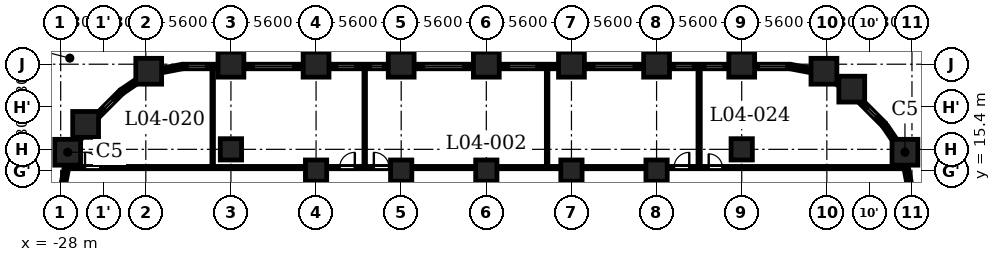
"""IFC4 building model, lengths in metres.
Left out: names, types, materials, properties, quantities, classifications, styles, units other than length and angle.
Written with IfcOpenShell. Run it as: python <this file> out.ifc"""

import sys

from ifc_helpers import new_model, si_unit, direction, frame, frame_2d, origin, origin_2d, place, context, subcontext, project, spatial, rectangle, extrude, element, fill, save


model = new_model("IFC4")
c1 = context("Model", 3, precision=1e-05, world=origin(), true_north=direction((0.0, 1.0)))
c2 = subcontext(c1, "Body", "Model", "MODEL_VIEW")
j1 = project(units=[si_unit("LENGTHUNIT", "METRE"), si_unit("PLANEANGLEUNIT", "RADIAN")], contexts=[c1])
p1 = place(None, origin())
s1 = spatial("IfcSite", under=j1, at=p1, CompositionType="ELEMENT")
p2 = place(p1, origin())
s2 = spatial("IfcBuilding", under=s1, at=p2, CompositionType="ELEMENT")
p3 = place(p2, frame((0.0, 0.0, 20.9)))
s3 = spatial("IfcBuildingStorey", under=s2, at=p3, CompositionType="ELEMENT", Elevation=20.9)
for number, where, z_axis, x_axis in (
    (1, (27.538, 16.609, 0.0), (0.0, 0.0, 1.0), (1.0, 0.0, 0.0)),
    (2, (24.04, 20.76, 0.0), (0.0, 0.0, 1.0), (1.0, 0.0, 0.0)),
    (3, (22.209, 21.938, 0.0), (0.0, 0.0, 1.0), (1.0, 0.0, 0.0)),
    (4, (16.8, 22.4, 0.0), (0.0, 0.0, 1.0), (1.0, 0.0, 0.0)),
    (5, (11.2, 22.4, 0.0), (0.0, 0.0, 1.0), (1.0, 0.0, 0.0)),
    (6, (5.6, 22.4, 0.0), (0.0, 0.0, 1.0), (1.0, 0.0, 0.0)),
    (7, (0.0, 22.4, 0.0), (0.0, 0.0, 1.0), (1.0, 0.0, 0.0)),
    (8, (-5.6, 22.4, 0.0), (0.0, 0.0, 1.0), (1.0, 0.0, 0.0)),
    (9, (-11.2, 22.4, 0.0), (0.0, 0.0, 1.0), (1.0, 0.0, 0.0)),
    (10, (-16.8, 22.4, 0.0), (0.0, 0.0, 1.0), (1.0, 0.0, 0.0)),
    (11, (-22.209, 21.938, 0.0), (0.0, 0.0, 1.0), (1.0, 0.0, 0.0)),
    (12, (-26.36, 18.44, 0.0), (0.0, 0.0, 1.0), (1.0, 0.0, 0.0)),
    (13, (-27.538, 16.609, 0.0), (0.0, 0.0, 1.0), (1.0, 0.0, 0.0)),
):
    element("IfcColumn", number, at=place(p3, frame(where, z_axis=z_axis, x_axis=x_axis)), inside=s3, PredefinedType="COLUMN", context=c2, shape_type="SweptSolid", body=[
        extrude(rectangle(XDim=1.7, YDim=1.7, at=origin_2d()), origin(), (0.0, 0.0, 1.0), 4.8),
    ])
for number, where, z_axis, x_axis in (
    (14, (-16.8, 16.8, 0.0), (0.0, 0.0, 1.0), (1.0, 0.0, 0.0)),
    (15, (16.8, 16.8, 0.0), (0.0, 0.0, 1.0), (1.0, 0.0, 0.0)),
    (16, (-11.2, 15.4, 0.0), (0.0, 0.0, 1.0), (1.0, 0.0, 0.0)),
    (17, (-5.6, 15.4, 0.0), (0.0, 0.0, 1.0), (1.0, 0.0, 0.0)),
    (18, (0.0, 15.4, 0.0), (0.0, 0.0, 1.0), (1.0, 0.0, 0.0)),
    (19, (5.6, 15.4, 0.0), (0.0, 0.0, 1.0), (1.0, 0.0, 0.0)),
    (20, (11.2, 15.4, 0.0), (0.0, 0.0, 1.0), (1.0, 0.0, 0.0)),
):
    element("IfcColumn", number, at=place(p3, frame(where, z_axis=z_axis, x_axis=x_axis)), inside=s3, PredefinedType="COLUMN", context=c2, shape_type="SweptSolid", body=[
        extrude(rectangle(XDim=1.4, YDim=1.4, at=origin_2d()), origin(), (0.0, 0.0, 1.0), 4.8),
    ])
for number, where, z_axis, x_axis in (
    (21, (27.853, 14.372, 0.0), (0.0, 0.0, 1.0), (-0.187, 0.982, 0.0)),
    (22, (26.969, 17.25, 0.0), (0.0, 0.0, 1.0), (-0.562, 0.827, 0.0)),
):
    element("IfcWall", number, at=place(p3, frame(where, z_axis=z_axis, x_axis=x_axis)), inside=s3, PredefinedType="SOLIDWALL", context=c2, shape_type="SweptSolid", body=[
        extrude(rectangle(XDim=1.406, YDim=0.3, at=frame_2d((0.703, 0.0))), origin(), (0.0, 0.0, 1.0), 3.55),
    ])
p4 = place(p3, frame((26.197, 18.391, 0.0), z_axis=(0.0, 0.0, 1.0), x_axis=(-0.707054835785, 0.707158722772, 0.0)))
e23 = element("IfcWall", 23, at=p4, inside=s3, PredefinedType="SOLIDWALL", context=c2, shape_type="SweptSolid", body=[
    extrude(rectangle(XDim=2.35, YDim=0.3, at=frame_2d((1.175, 0.0))), origin(), (0.0, 0.0, 1.0), 3.55),
])
p5 = place(p4, frame((0.775, 0.0, 0.6)))
e24 = element("IfcOpeningElement", 24, at=p5, cuts=e23, PredefinedType="OPENING", context=c2, shape_type="SweptSolid", body=[
    extrude(rectangle(XDim=0.8, YDim=1.55, at=frame_2d((0.4, 0.775))), frame((0.0, 0.16, 0.0), z_axis=(0.0, -1.0, 0.0), x_axis=(1.0, 0.0, 0.0)), (0.0, 0.0, 1.0), 0.32),
])
p6 = place(p3, frame((23.244, 21.101, 0.0), z_axis=(0.0, 0.0, 1.0), x_axis=(-0.827135885329, 0.562001981492, 0.0)))
e25 = element("IfcWall", 25, at=p6, inside=s3, PredefinedType="SOLIDWALL", context=c2, shape_type="SweptSolid", body=[
    extrude(rectangle(XDim=0.477, YDim=0.3, at=frame_2d((0.239, 0.0))), origin(), (0.0, 0.0, 1.0), 4.45),
])
p7 = place(p3, frame((21.353, 21.989, 0.0), z_axis=(0.0, 0.0, 1.0), x_axis=(-0.98229142023, 0.187359455971, 0.0)))
e26 = element("IfcWall", 26, at=p7, inside=s3, PredefinedType="SOLIDWALL", context=c2, shape_type="SweptSolid", body=[
    extrude(rectangle(XDim=1.406, YDim=0.3, at=frame_2d((0.703, 0.0))), origin(), (0.0, 0.0, 1.0), 3.55),
])
p8 = place(p3, frame((20.0, 22.25, 0.0), z_axis=(0.0, 0.0, 1.0), x_axis=(-1.0, 0.0, 0.0)))
e27 = element("IfcWall", 27, at=p8, inside=s3, PredefinedType="SOLIDWALL", context=c2, shape_type="SweptSolid", body=[
    extrude(rectangle(XDim=2.35, YDim=0.3, at=frame_2d((1.175, 0.0))), origin(), (0.0, 0.0, 1.0), 3.55),
])
p9 = place(p8, frame((0.275, 0.0, 0.9)))
e28 = element("IfcOpeningElement", 28, at=p9, cuts=e27, PredefinedType="OPENING", context=c2, shape_type="SweptSolid", body=[
    extrude(rectangle(XDim=1.8, YDim=1.25, at=frame_2d((0.9, 0.625))), frame((0.0, 0.16, 0.0), z_axis=(0.0, -1.0, 0.0), x_axis=(1.0, 0.0, 0.0)), (0.0, 0.0, 1.0), 0.32),
])
p10 = place(p3, frame((15.95, 22.25, 0.0), z_axis=(0.0, 0.0, 1.0), x_axis=(-1.0, 0.0, 0.0)))
e29 = element("IfcWall", 29, at=p10, inside=s3, PredefinedType="SOLIDWALL", context=c2, shape_type="SweptSolid", body=[
    extrude(rectangle(XDim=3.9, YDim=0.3, at=frame_2d((1.95, 0.0))), origin(), (0.0, 0.0, 1.0), 3.55),
])
p11 = place(p10, frame((0.337, 0.0, 0.6)))
e30 = element("IfcOpeningElement", 30, at=p11, cuts=e29, PredefinedType="OPENING", context=c2, shape_type="SweptSolid", body=[
    extrude(rectangle(XDim=1.2, YDim=1.55, at=frame_2d((0.6, 0.775))), frame((0.0, 0.16, 0.0), z_axis=(0.0, -1.0, 0.0), x_axis=(1.0, 0.0, 0.0)), (0.0, 0.0, 1.0), 0.32),
])
p12 = place(p10, frame((2.363, 0.0, 0.6)))
e31 = element("IfcOpeningElement", 31, at=p12, cuts=e29, PredefinedType="OPENING", context=c2, shape_type="SweptSolid", body=[
    extrude(rectangle(XDim=1.2, YDim=1.55, at=frame_2d((0.6, 0.775))), frame((0.0, 0.16, 0.0), z_axis=(0.0, -1.0, 0.0), x_axis=(1.0, 0.0, 0.0)), (0.0, 0.0, 1.0), 0.32),
])
p13 = place(p3, frame((10.35, 22.25, 0.0), z_axis=(0.0, 0.0, 1.0), x_axis=(-1.0, 0.0, 0.0)))
e32 = element("IfcWall", 32, at=p13, inside=s3, PredefinedType="SOLIDWALL", context=c2, shape_type="SweptSolid", body=[
    extrude(rectangle(XDim=3.9, YDim=0.3, at=frame_2d((1.95, 0.0))), origin(), (0.0, 0.0, 1.0), 3.55),
])
p14 = place(p13, frame((0.65, 0.0, 0.9)))
e33 = element("IfcOpeningElement", 33, at=p14, cuts=e32, PredefinedType="OPENING", context=c2, shape_type="SweptSolid", body=[
    extrude(rectangle(XDim=2.6, YDim=1.25, at=frame_2d((1.3, 0.625))), frame((0.0, 0.16, 0.0), z_axis=(0.0, -1.0, 0.0), x_axis=(1.0, 0.0, 0.0)), (0.0, 0.0, 1.0), 0.32),
])
p15 = place(p3, frame((4.75, 22.25, 0.0), z_axis=(0.0, 0.0, 1.0), x_axis=(-1.0, 0.0, 0.0)))
e34 = element("IfcWall", 34, at=p15, inside=s3, PredefinedType="SOLIDWALL", context=c2, shape_type="SweptSolid", body=[
    extrude(rectangle(XDim=3.9, YDim=0.3, at=frame_2d((1.95, 0.0))), origin(), (0.0, 0.0, 1.0), 3.55),
])
p16 = place(p15, frame((1.462, 0.0, 0.9)))
e35 = element("IfcOpeningElement", 35, at=p16, cuts=e34, PredefinedType="OPENING", context=c2, shape_type="SweptSolid", body=[
    extrude(rectangle(XDim=1.8, YDim=1.25, at=frame_2d((0.9, 0.625))), frame((0.0, 0.16, 0.0), z_axis=(0.0, -1.0, 0.0), x_axis=(1.0, 0.0, 0.0)), (0.0, 0.0, 1.0), 0.32),
])
p17 = place(p3, frame((-0.85, 22.25, 0.0), z_axis=(0.0, 0.0, 1.0), x_axis=(-1.0, 0.0, 0.0)))
e36 = element("IfcWall", 36, at=p17, inside=s3, PredefinedType="SOLIDWALL", context=c2, shape_type="SweptSolid", body=[
    extrude(rectangle(XDim=3.9, YDim=0.3, at=frame_2d((1.95, 0.0))), origin(), (0.0, 0.0, 1.0), 3.55),
])
p18 = place(p17, frame((0.65, 0.0, 0.9)))
e37 = element("IfcOpeningElement", 37, at=p18, cuts=e36, PredefinedType="OPENING", context=c2, shape_type="SweptSolid", body=[
    extrude(rectangle(XDim=2.6, YDim=1.25, at=frame_2d((1.3, 0.625))), frame((0.0, 0.16, 0.0), z_axis=(0.0, -1.0, 0.0), x_axis=(1.0, 0.0, 0.0)), (0.0, 0.0, 1.0), 0.32),
])
p19 = place(p3, frame((-6.45, 22.25, 0.0), z_axis=(0.0, 0.0, 1.0), x_axis=(-1.0, 0.0, 0.0)))
e38 = element("IfcWall", 38, at=p19, inside=s3, PredefinedType="SOLIDWALL", context=c2, shape_type="SweptSolid", body=[
    extrude(rectangle(XDim=3.9, YDim=0.3, at=frame_2d((1.95, 0.0))), origin(), (0.0, 0.0, 1.0), 3.55),
])
p20 = place(p19, frame((0.337, 0.0, 0.6)))
e39 = element("IfcOpeningElement", 39, at=p20, cuts=e38, PredefinedType="OPENING", context=c2, shape_type="SweptSolid", body=[
    extrude(rectangle(XDim=0.8, YDim=1.55, at=frame_2d((0.4, 0.775))), frame((0.0, 0.16, 0.0), z_axis=(0.0, -1.0, 0.0), x_axis=(1.0, 0.0, 0.0)), (0.0, 0.0, 1.0), 0.32),
])
p21 = place(p19, frame((2.163, 0.0, 0.6)))
e40 = element("IfcOpeningElement", 40, at=p21, cuts=e38, PredefinedType="OPENING", context=c2, shape_type="SweptSolid", body=[
    extrude(rectangle(XDim=1.2, YDim=1.55, at=frame_2d((0.6, 0.775))), frame((0.0, 0.16, 0.0), z_axis=(0.0, -1.0, 0.0), x_axis=(1.0, 0.0, 0.0)), (0.0, 0.0, 1.0), 0.32),
])
p22 = place(p3, frame((-12.05, 22.25, 0.0), z_axis=(0.0, 0.0, 1.0), x_axis=(-1.0, 0.0, 0.0)))
e41 = element("IfcWall", 41, at=p22, inside=s3, PredefinedType="SOLIDWALL", context=c2, shape_type="SweptSolid", body=[
    extrude(rectangle(XDim=3.9, YDim=0.3, at=frame_2d((1.95, 0.0))), origin(), (0.0, 0.0, 1.0), 3.55),
])
p23 = place(p22, frame((0.65, 0.0, 0.9)))
e42 = element("IfcOpeningElement", 42, at=p23, cuts=e41, PredefinedType="OPENING", context=c2, shape_type="SweptSolid", body=[
    extrude(rectangle(XDim=2.6, YDim=1.25, at=frame_2d((1.3, 0.625))), frame((0.0, 0.16, 0.0), z_axis=(0.0, -1.0, 0.0), x_axis=(1.0, 0.0, 0.0)), (0.0, 0.0, 1.0), 0.32),
])
p24 = place(p3, frame((-17.65, 22.25, 0.0), z_axis=(0.0, 0.0, 1.0), x_axis=(-1.0, 0.0, 0.0)))
e43 = element("IfcWall", 43, at=p24, inside=s3, PredefinedType="SOLIDWALL", context=c2, shape_type="SweptSolid", body=[
    extrude(rectangle(XDim=2.35, YDim=0.3, at=frame_2d((1.175, 0.0))), origin(), (0.0, 0.0, 1.0), 3.55),
])
p25 = place(p24, frame((0.788, 0.0, 0.6)))
e44 = element("IfcOpeningElement", 44, at=p25, cuts=e43, PredefinedType="OPENING", context=c2, shape_type="SweptSolid", body=[
    extrude(rectangle(XDim=1.2, YDim=1.55, at=frame_2d((0.6, 0.775))), frame((0.0, 0.16, 0.0), z_axis=(0.0, -1.0, 0.0), x_axis=(1.0, 0.0, 0.0)), (0.0, 0.0, 1.0), 0.32),
])
for number, where, z_axis, x_axis in (
    (45, (-19.972, 22.253, 0.0), (0.0, 0.0, 1.0), (-0.982, -0.187, 0.0)),
    (46, (-22.85, 21.369, 0.0), (0.0, 0.0, 1.0), (-0.827, -0.562, 0.0)),
):
    element("IfcWall", number, at=place(p3, frame(where, z_axis=z_axis, x_axis=x_axis)), inside=s3, PredefinedType="SOLIDWALL", context=c2, shape_type="SweptSolid", body=[
        extrude(rectangle(XDim=1.406, YDim=0.3, at=frame_2d((0.703, 0.0))), origin(), (0.0, 0.0, 1.0), 3.55),
    ])
p26 = place(p3, frame((-23.991, 20.597, 0.0), z_axis=(0.0, 0.0, 1.0), x_axis=(-0.707054835785, -0.707158722772, 0.0)))
e47 = element("IfcWall", 47, at=p26, inside=s3, PredefinedType="SOLIDWALL", context=c2, shape_type="SweptSolid", body=[
    extrude(rectangle(XDim=2.35, YDim=0.3, at=frame_2d((1.175, 0.0))), origin(), (0.0, 0.0, 1.0), 3.55),
])
p27 = place(p26, frame((0.775, 0.0, 0.6)))
e48 = element("IfcOpeningElement", 48, at=p27, cuts=e47, PredefinedType="OPENING", context=c2, shape_type="SweptSolid", body=[
    extrude(rectangle(XDim=0.8, YDim=1.55, at=frame_2d((0.4, 0.775))), frame((0.0, 0.16, 0.0), z_axis=(0.0, -1.0, 0.0), x_axis=(1.0, 0.0, 0.0)), (0.0, 0.0, 1.0), 0.32),
])
p28 = place(p3, frame((-26.701, 17.644, 0.0), z_axis=(0.0, 0.0, 1.0), x_axis=(-0.562001981492, -0.827135885329, 0.0)))
e49 = element("IfcWall", 49, at=p28, inside=s3, PredefinedType="SOLIDWALL", context=c2, shape_type="SweptSolid", body=[
    extrude(rectangle(XDim=0.477, YDim=0.3, at=frame_2d((0.239, 0.0))), origin(), (0.0, 0.0, 1.0), 4.45),
])
p29 = place(p3, frame((-27.589, 15.753, 0.0), z_axis=(0.0, 0.0, 1.0), x_axis=(-0.187327504018, -0.982297514116, 0.0)))
e50 = element("IfcWall", 50, at=p29, inside=s3, PredefinedType="SOLIDWALL", context=c2, shape_type="SweptSolid", body=[
    extrude(rectangle(XDim=1.406, YDim=0.3, at=frame_2d((0.703, 0.0))), origin(), (0.0, 0.0, 1.0), 3.55),
])
p30 = place(p3, frame((-27.446, 15.6, 0.0), z_axis=(0.0, 0.0, 1.0), x_axis=(1.0, 0.0, 0.0)))
e51 = element("IfcWall", 51, at=p30, inside=s3, PredefinedType="PARTITIONING", context=c2, shape_type="SweptSolid", body=[
    extrude(rectangle(XDim=54.892, YDim=0.15, at=frame_2d((27.446, 0.0))), origin(), (0.0, 0.0, 1.0), 4.45),
])
p31 = place(p30, frame((1.046, 0.0, 0.0)))
e52 = element("IfcOpeningElement", 52, at=p31, cuts=e51, PredefinedType="OPENING", context=c2, shape_type="SweptSolid", body=[
    extrude(rectangle(XDim=1.0, YDim=2.1, at=frame_2d((0.5, 1.05))), frame((0.0, 0.085, 0.0), z_axis=(0.0, -1.0, 0.0), x_axis=(1.0, 0.0, 0.0)), (0.0, 0.0, 1.0), 0.17),
])
p32 = place(p30, frame((17.796, 0.0, 0.0)))
e53 = element("IfcOpeningElement", 53, at=p32, cuts=e51, PredefinedType="OPENING", context=c2, shape_type="SweptSolid", body=[
    extrude(rectangle(XDim=1.0, YDim=2.1, at=frame_2d((0.5, 1.05))), frame((0.0, 0.085, 0.0), z_axis=(0.0, -1.0, 0.0), x_axis=(1.0, 0.0, 0.0)), (0.0, 0.0, 1.0), 0.17),
])
p33 = place(p30, frame((20.046, 0.0, 0.0)))
e54 = element("IfcOpeningElement", 54, at=p33, cuts=e51, PredefinedType="OPENING", context=c2, shape_type="SweptSolid", body=[
    extrude(rectangle(XDim=1.0, YDim=2.1, at=frame_2d((0.5, 1.05))), frame((0.0, 0.085, 0.0), z_axis=(0.0, -1.0, 0.0), x_axis=(1.0, 0.0, 0.0)), (0.0, 0.0, 1.0), 0.17),
])
p34 = place(p30, frame((39.796, 0.0, 0.0)))
e55 = element("IfcOpeningElement", 55, at=p34, cuts=e51, PredefinedType="OPENING", context=c2, shape_type="SweptSolid", body=[
    extrude(rectangle(XDim=1.0, YDim=2.1, at=frame_2d((0.5, 1.05))), frame((0.0, 0.085, 0.0), z_axis=(0.0, -1.0, 0.0), x_axis=(1.0, 0.0, 0.0)), (0.0, 0.0, 1.0), 0.17),
])
p35 = place(p30, frame((42.075, 0.0, 0.0)))
e56 = element("IfcOpeningElement", 56, at=p35, cuts=e51, PredefinedType="OPENING", context=c2, shape_type="SweptSolid", body=[
    extrude(rectangle(XDim=0.9, YDim=2.1, at=frame_2d((0.45, 1.05))), frame((0.0, 0.085, 0.0), z_axis=(0.0, -1.0, 0.0), x_axis=(1.0, 0.0, 0.0)), (0.0, 0.0, 1.0), 0.17),
])
for number, where, z_axis, x_axis in (
    (57, (-18.0, 15.675, 0.0), (0.0, 0.0, 1.0), (0.0, 1.0, 0.0)),
    (58, (-8.0, 15.675, 0.0), (0.0, 0.0, 1.0), (0.0, 1.0, 0.0)),
    (59, (4.0, 15.675, 0.0), (0.0, 0.0, 1.0), (0.0, 1.0, 0.0)),
):
    element("IfcWall", number, at=place(p3, frame(where, z_axis=z_axis, x_axis=x_axis)), inside=s3, PredefinedType="PARTITIONING", context=c2, shape_type="SweptSolid", body=[
        extrude(rectangle(XDim=6.405, YDim=0.1, at=frame_2d((3.203, 0.0))), origin(), (0.0, 0.0, 1.0), 4.45),
    ])
p36 = place(p3, frame((14.0, 15.675, 0.0), z_axis=(0.0, 0.0, 1.0), x_axis=(0.0, 1.0, 0.0)))
e60 = element("IfcWall", 60, at=p36, inside=s3, PredefinedType="PARTITIONING", context=c2, shape_type="SweptSolid", body=[
    extrude(rectangle(XDim=6.405, YDim=0.15, at=frame_2d((3.203, 0.0))), origin(), (0.0, 0.0, 1.0), 4.45),
])
p37 = place(p31, origin())
e61 = element("IfcDoor", 61, at=p37, inside=s3, OperationType="SINGLE_SWING_RIGHT", PredefinedType="DOOR", context=c2, shape_type="SweptSolid", body=[
    extrude(rectangle(XDim=1.0, YDim=2.1, at=frame_2d((0.5, 1.05))), frame((0.0, 0.025, 0.0), z_axis=(0.0, -1.0, 0.0), x_axis=(1.0, 0.0, 0.0)), (0.0, 0.0, 1.0), 0.05),
])
fill(e52, e61)
p38 = place(p32, origin())
e62 = element("IfcDoor", 62, at=p38, inside=s3, OperationType="SINGLE_SWING_LEFT", PredefinedType="DOOR", context=c2, shape_type="SweptSolid", body=[
    extrude(rectangle(XDim=1.0, YDim=2.1, at=frame_2d((0.5, 1.05))), frame((0.0, 0.025, 0.0), z_axis=(0.0, -1.0, 0.0), x_axis=(1.0, 0.0, 0.0)), (0.0, 0.0, 1.0), 0.05),
])
fill(e53, e62)
p39 = place(p33, origin())
e63 = element("IfcDoor", 63, at=p39, inside=s3, OperationType="SINGLE_SWING_RIGHT", PredefinedType="DOOR", context=c2, shape_type="SweptSolid", body=[
    extrude(rectangle(XDim=1.0, YDim=2.1, at=frame_2d((0.5, 1.05))), frame((0.0, 0.025, 0.0), z_axis=(0.0, -1.0, 0.0), x_axis=(1.0, 0.0, 0.0)), (0.0, 0.0, 1.0), 0.05),
])
fill(e54, e63)
p40 = place(p34, origin())
e64 = element("IfcDoor", 64, at=p40, inside=s3, OperationType="SINGLE_SWING_LEFT", PredefinedType="DOOR", context=c2, shape_type="SweptSolid", body=[
    extrude(rectangle(XDim=1.0, YDim=2.1, at=frame_2d((0.5, 1.05))), frame((0.0, 0.025, 0.0), z_axis=(0.0, -1.0, 0.0), x_axis=(1.0, 0.0, 0.0)), (0.0, 0.0, 1.0), 0.05),
])
fill(e55, e64)
p41 = place(p35, origin())
e65 = element("IfcDoor", 65, at=p41, inside=s3, OperationType="SINGLE_SWING_RIGHT", PredefinedType="DOOR", context=c2, shape_type="SweptSolid", body=[
    extrude(rectangle(XDim=0.9, YDim=2.1, at=frame_2d((0.45, 1.05))), frame((0.0, 0.025, 0.0), z_axis=(0.0, -1.0, 0.0), x_axis=(1.0, 0.0, 0.0)), (0.0, 0.0, 1.0), 0.05),
])
fill(e56, e65)
p42 = place(p5, origin())
e66 = element("IfcWindow", 66, at=p42, inside=s3, PartitioningType="SINGLE_PANEL", PredefinedType="WINDOW", context=c2, shape_type="SweptSolid", body=[
    extrude(rectangle(XDim=0.8, YDim=1.55, at=frame_2d((0.4, 0.775))), frame((0.0, 0.03, 0.0), z_axis=(0.0, -1.0, 0.0), x_axis=(1.0, 0.0, 0.0)), (0.0, 0.0, 1.0), 0.06),
])
fill(e24, e66)
p43 = place(p9, origin())
e67 = element("IfcWindow", 67, at=p43, inside=s3, PartitioningType="SINGLE_PANEL", PredefinedType="WINDOW", context=c2, shape_type="SweptSolid", body=[
    extrude(rectangle(XDim=1.8, YDim=1.25, at=frame_2d((0.9, 0.625))), frame((0.0, 0.03, 0.0), z_axis=(0.0, -1.0, 0.0), x_axis=(1.0, 0.0, 0.0)), (0.0, 0.0, 1.0), 0.06),
])
fill(e28, e67)
p44 = place(p11, origin())
e68 = element("IfcWindow", 68, at=p44, inside=s3, PartitioningType="SINGLE_PANEL", PredefinedType="WINDOW", context=c2, shape_type="SweptSolid", body=[
    extrude(rectangle(XDim=1.2, YDim=1.55, at=frame_2d((0.6, 0.775))), frame((0.0, 0.03, 0.0), z_axis=(0.0, -1.0, 0.0), x_axis=(1.0, 0.0, 0.0)), (0.0, 0.0, 1.0), 0.06),
])
fill(e30, e68)
p45 = place(p12, origin())
e69 = element("IfcWindow", 69, at=p45, inside=s3, PartitioningType="SINGLE_PANEL", PredefinedType="WINDOW", context=c2, shape_type="SweptSolid", body=[
    extrude(rectangle(XDim=1.2, YDim=1.55, at=frame_2d((0.6, 0.775))), frame((0.0, 0.03, 0.0), z_axis=(0.0, -1.0, 0.0), x_axis=(1.0, 0.0, 0.0)), (0.0, 0.0, 1.0), 0.06),
])
fill(e31, e69)
p46 = place(p14, origin())
e70 = element("IfcWindow", 70, at=p46, inside=s3, PartitioningType="SINGLE_PANEL", PredefinedType="WINDOW", context=c2, shape_type="SweptSolid", body=[
    extrude(rectangle(XDim=2.6, YDim=1.25, at=frame_2d((1.3, 0.625))), frame((0.0, 0.03, 0.0), z_axis=(0.0, -1.0, 0.0), x_axis=(1.0, 0.0, 0.0)), (0.0, 0.0, 1.0), 0.06),
])
fill(e33, e70)
p47 = place(p16, origin())
e71 = element("IfcWindow", 71, at=p47, inside=s3, PartitioningType="SINGLE_PANEL", PredefinedType="WINDOW", context=c2, shape_type="SweptSolid", body=[
    extrude(rectangle(XDim=1.8, YDim=1.25, at=frame_2d((0.9, 0.625))), frame((0.0, 0.03, 0.0), z_axis=(0.0, -1.0, 0.0), x_axis=(1.0, 0.0, 0.0)), (0.0, 0.0, 1.0), 0.06),
])
fill(e35, e71)
p48 = place(p18, origin())
e72 = element("IfcWindow", 72, at=p48, inside=s3, PartitioningType="SINGLE_PANEL", PredefinedType="WINDOW", context=c2, shape_type="SweptSolid", body=[
    extrude(rectangle(XDim=2.6, YDim=1.25, at=frame_2d((1.3, 0.625))), frame((0.0, 0.03, 0.0), z_axis=(0.0, -1.0, 0.0), x_axis=(1.0, 0.0, 0.0)), (0.0, 0.0, 1.0), 0.06),
])
fill(e37, e72)
p49 = place(p20, origin())
e73 = element("IfcWindow", 73, at=p49, inside=s3, PartitioningType="SINGLE_PANEL", PredefinedType="WINDOW", context=c2, shape_type="SweptSolid", body=[
    extrude(rectangle(XDim=0.8, YDim=1.55, at=frame_2d((0.4, 0.775))), frame((0.0, 0.03, 0.0), z_axis=(0.0, -1.0, 0.0), x_axis=(1.0, 0.0, 0.0)), (0.0, 0.0, 1.0), 0.06),
])
fill(e39, e73)
p50 = place(p21, origin())
e74 = element("IfcWindow", 74, at=p50, inside=s3, PartitioningType="SINGLE_PANEL", PredefinedType="WINDOW", context=c2, shape_type="SweptSolid", body=[
    extrude(rectangle(XDim=1.2, YDim=1.55, at=frame_2d((0.6, 0.775))), frame((0.0, 0.03, 0.0), z_axis=(0.0, -1.0, 0.0), x_axis=(1.0, 0.0, 0.0)), (0.0, 0.0, 1.0), 0.06),
])
fill(e40, e74)
p51 = place(p23, origin())
e75 = element("IfcWindow", 75, at=p51, inside=s3, PartitioningType="SINGLE_PANEL", PredefinedType="WINDOW", context=c2, shape_type="SweptSolid", body=[
    extrude(rectangle(XDim=2.6, YDim=1.25, at=frame_2d((1.3, 0.625))), frame((0.0, 0.03, 0.0), z_axis=(0.0, -1.0, 0.0), x_axis=(1.0, 0.0, 0.0)), (0.0, 0.0, 1.0), 0.06),
])
fill(e42, e75)
p52 = place(p25, origin())
e76 = element("IfcWindow", 76, at=p52, inside=s3, PartitioningType="SINGLE_PANEL", PredefinedType="WINDOW", context=c2, shape_type="SweptSolid", body=[
    extrude(rectangle(XDim=1.2, YDim=1.55, at=frame_2d((0.6, 0.775))), frame((0.0, 0.03, 0.0), z_axis=(0.0, -1.0, 0.0), x_axis=(1.0, 0.0, 0.0)), (0.0, 0.0, 1.0), 0.06),
])
fill(e44, e76)
p53 = place(p27, origin())
e77 = element("IfcWindow", 77, at=p53, inside=s3, PartitioningType="SINGLE_PANEL", PredefinedType="WINDOW", context=c2, shape_type="SweptSolid", body=[
    extrude(rectangle(XDim=0.8, YDim=1.55, at=frame_2d((0.4, 0.775))), frame((0.0, 0.03, 0.0), z_axis=(0.0, -1.0, 0.0), x_axis=(1.0, 0.0, 0.0)), (0.0, 0.0, 1.0), 0.06),
])
fill(e48, e77)
save(model, sys.argv[1])
